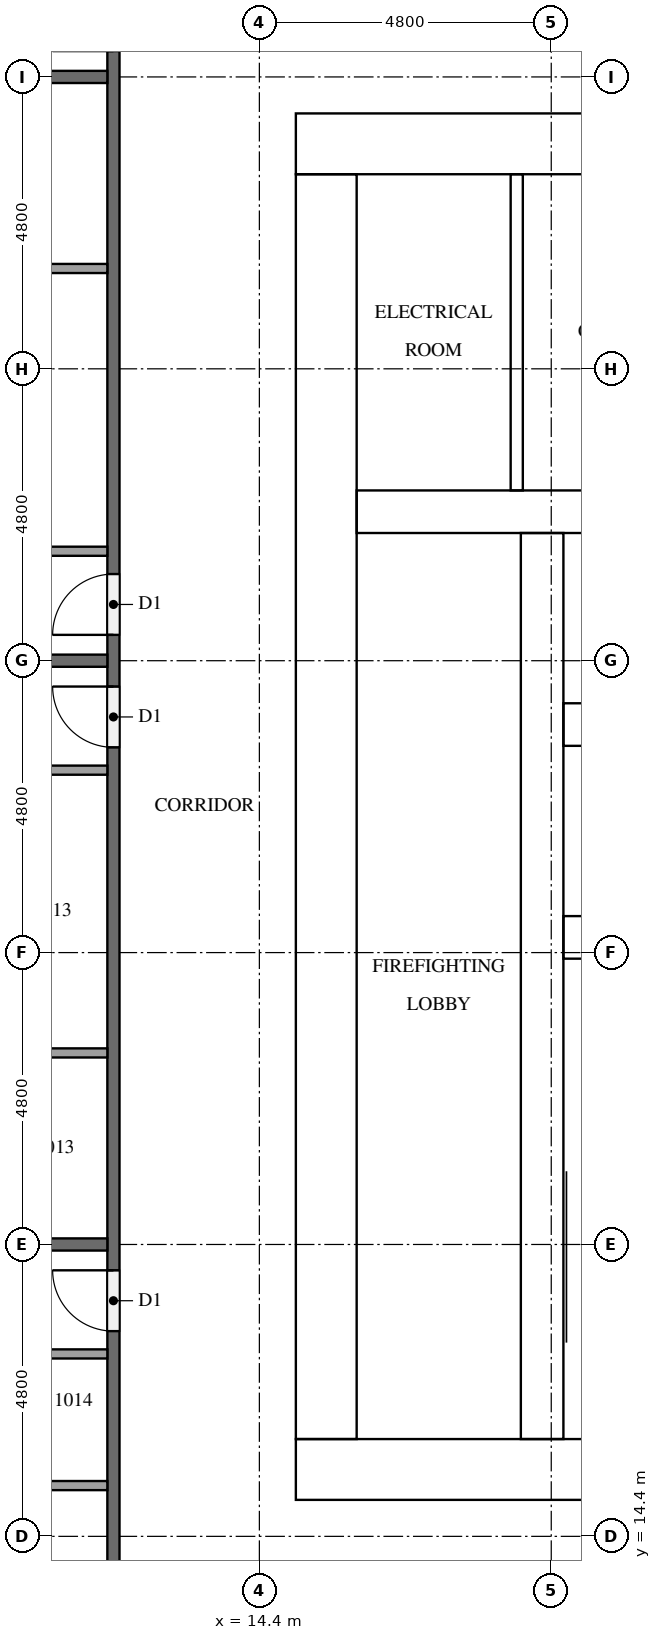
"""IFC4 building model, lengths in metres.
Left out: names, types, materials, properties, quantities, classifications, styles, units other than length and angle.
Written with IfcOpenShell. Run it as: python <this file> out.ifc"""

import sys

from ifc_helpers import new_model, si_unit, direction, frame, frame_2d, origin, place, context, subcontext, project, spatial, rectangle, extrude, element, fill, save


model = new_model("IFC4")
c1 = context("Model", 3, precision=1e-05, world=origin(), true_north=direction((0.0, 1.0)))
c2 = subcontext(c1, "Body", "Model", "MODEL_VIEW")
j1 = project(units=[si_unit("LENGTHUNIT", "METRE"), si_unit("PLANEANGLEUNIT", "RADIAN")], contexts=[c1])
p1 = place(None, origin())
s1 = spatial("IfcSite", under=j1, at=p1, CompositionType="ELEMENT")
p2 = place(p1, origin())
s2 = spatial("IfcBuilding", under=s1, at=p2, CompositionType="ELEMENT")
p3 = place(p2, frame((0.0, 0.0, 43.4)))
s3 = spatial("IfcBuildingStorey", under=s2, at=p3, CompositionType="ELEMENT", Elevation=43.4)
p4 = place(p3, frame((15.0, 15.5, 0.0), z_axis=(0.0, 0.0, 1.0), x_axis=(1.0, 0.0, 0.0)))
e1 = element("IfcWall", 1, at=p4, inside=s3, PredefinedType="SHEAR", context=c2, shape_type="SweptSolid", body=[
    extrude(rectangle(XDim=32.4, YDim=1.0, at=frame_2d((16.2, 0.0))), origin(), (0.0, 0.0, 1.0), 3.2),
])
p5 = place(p4, frame((15.3, 0.0, 0.0)))
e2 = element("IfcOpeningElement", 2, at=p5, cuts=e1, PredefinedType="OPENING", context=c2, shape_type="SweptSolid", body=[
    extrude(rectangle(XDim=1.8, YDim=2.1, at=frame_2d((0.9, 1.05))), frame((0.0, 0.51, 0.0), z_axis=(0.0, -1.0, 0.0), x_axis=(1.0, 0.0, 0.0)), (0.0, 0.0, 1.0), 1.02),
])
p6 = place(p3, frame((15.0, 37.3, 0.0), z_axis=(0.0, 0.0, 1.0), x_axis=(1.0, 0.0, 0.0)))
e3 = element("IfcWall", 3, at=p6, inside=s3, PredefinedType="SHEAR", context=c2, shape_type="SweptSolid", body=[
    extrude(rectangle(XDim=32.4, YDim=1.0, at=frame_2d((16.2, 0.0))), origin(), (0.0, 0.0, 1.0), 3.2),
])
p7 = place(p6, frame((15.3, 0.0, 0.0)))
e4 = element("IfcOpeningElement", 4, at=p7, cuts=e3, PredefinedType="OPENING", context=c2, shape_type="SweptSolid", body=[
    extrude(rectangle(XDim=1.8, YDim=2.1, at=frame_2d((0.9, 1.05))), frame((0.0, 0.51, 0.0), z_axis=(0.0, -1.0, 0.0), x_axis=(1.0, 0.0, 0.0)), (0.0, 0.0, 1.0), 1.02),
])
p8 = place(p6, frame((1.766, 0.0, 0.0)))
e5 = element("IfcOpeningElement", 5, at=p8, cuts=e3, PredefinedType="OPENING", context=c2, shape_type="SweptSolid", body=[
    extrude(rectangle(XDim=1.0, YDim=2.1, at=frame_2d((0.5, 1.05))), frame((0.0, 0.51, 0.0), z_axis=(0.0, -1.0, 0.0), x_axis=(1.0, 0.0, 0.0)), (0.0, 0.0, 1.0), 1.02),
])
p9 = place(p6, frame((5.241, 0.0, 0.0)))
e6 = element("IfcOpeningElement", 6, at=p9, cuts=e3, PredefinedType="OPENING", context=c2, shape_type="SweptSolid", body=[
    extrude(rectangle(XDim=1.0, YDim=2.1, at=frame_2d((0.5, 1.05))), frame((0.0, 0.51, 0.0), z_axis=(0.0, -1.0, 0.0), x_axis=(1.0, 0.0, 0.0)), (0.0, 0.0, 1.0), 1.02),
])
p10 = place(p3, frame((15.5, 16.0, 0.0), z_axis=(0.0, 0.0, 1.0), x_axis=(0.0, 1.0, 0.0)))
e7 = element("IfcWall", 7, at=p10, inside=s3, PredefinedType="SHEAR", context=c2, shape_type="SweptSolid", body=[
    extrude(rectangle(XDim=20.8, YDim=1.0, at=frame_2d((10.4, 0.0))), origin(), (0.0, 0.0, 1.0), 3.2),
])
p11 = place(p10, frame((4.76, 0.0, 0.0)))
e8 = element("IfcOpeningElement", 8, at=p11, cuts=e7, PredefinedType="OPENING", context=c2, shape_type="SweptSolid", body=[
    extrude(rectangle(XDim=1.2, YDim=2.1, at=frame_2d((0.6, 1.05))), frame((0.0, 0.51, 0.0), z_axis=(0.0, -1.0, 0.0), x_axis=(1.0, 0.0, 0.0)), (0.0, 0.0, 1.0), 1.02),
])
p12 = place(p3, frame((19.05, 16.0, 0.0), z_axis=(0.0, 0.0, 1.0), x_axis=(0.0, 1.0, 0.0)))
e9 = element("IfcWall", 9, at=p12, inside=s3, PredefinedType="SHEAR", context=c2, shape_type="SweptSolid", body=[
    extrude(rectangle(XDim=14.9, YDim=0.7, at=frame_2d((7.45, 0.0))), origin(), (0.0, 0.0, 1.0), 3.2),
])
p13 = place(p12, frame((9.45, 0.0, 0.0)))
e10 = element("IfcOpeningElement", 10, at=p13, cuts=e9, PredefinedType="OPENING", context=c2, shape_type="SweptSolid", body=[
    extrude(rectangle(XDim=1.1, YDim=2.1, at=frame_2d((0.55, 1.05))), frame((0.0, 0.36, 0.0), z_axis=(0.0, -1.0, 0.0), x_axis=(1.0, 0.0, 0.0)), (0.0, 0.0, 1.0), 0.72),
])
p14 = place(p12, frame((12.95, 0.0, 0.0)))
e11 = element("IfcOpeningElement", 11, at=p14, cuts=e9, PredefinedType="OPENING", context=c2, shape_type="SweptSolid", body=[
    extrude(rectangle(XDim=1.1, YDim=2.1, at=frame_2d((0.55, 1.05))), frame((0.0, 0.36, 0.0), z_axis=(0.0, -1.0, 0.0), x_axis=(1.0, 0.0, 0.0)), (0.0, 0.0, 1.0), 0.72),
])
p15 = place(p12, frame((0.2, 0.0, 0.0)))
e12 = element("IfcOpeningElement", 12, at=p15, cuts=e9, PredefinedType="OPENING", context=c2, shape_type="SweptSolid", body=[
    extrude(rectangle(XDim=1.2, YDim=2.1, at=frame_2d((0.6, 1.05))), frame((0.0, 0.36, 0.0), z_axis=(0.0, -1.0, 0.0), x_axis=(1.0, 0.0, 0.0)), (0.0, 0.0, 1.0), 0.72),
])
for number, where, z_axis, x_axis in (
    (13, (19.4, 24.25, 0.0), (0.0, 0.0, 1.0), (1.0, 0.0, 0.0)),
    (14, (19.4, 27.75, 0.0), (0.0, 0.0, 1.0), (1.0, 0.0, 0.0)),
):
    element("IfcWall", number, at=place(p3, frame(where, z_axis=z_axis, x_axis=x_axis)), inside=s3, PredefinedType="SHEAR", context=c2, shape_type="SweptSolid", body=[
        extrude(rectangle(XDim=3.35, YDim=0.7, at=frame_2d((1.675, 0.0))), origin(), (0.0, 0.0, 1.0), 3.2),
    ])
p16 = place(p3, frame((16.0, 31.25, 0.0), z_axis=(0.0, 0.0, 1.0), x_axis=(1.0, 0.0, 0.0)))
e15 = element("IfcWall", 15, at=p16, inside=s3, PredefinedType="SHEAR", context=c2, shape_type="SweptSolid", body=[
    extrude(rectangle(XDim=6.75, YDim=0.7, at=frame_2d((3.375, 0.0))), origin(), (0.0, 0.0, 1.0), 3.2),
])
p17 = place(p3, frame((18.633, 31.6, 0.0), z_axis=(0.0, 0.0, 1.0), x_axis=(0.0, 1.0, 0.0)))
e16 = element("IfcWall", 16, at=p17, inside=s3, PredefinedType="PARTITIONING", context=c2, shape_type="SweptSolid", body=[
    extrude(rectangle(XDim=5.2, YDim=0.2, at=frame_2d((2.6, 0.0))), origin(), (0.0, 0.0, 1.0), 3.2),
])
p18 = place(p3, frame((12.0, 12.1, 0.0), z_axis=(0.0, 0.0, 1.0), x_axis=(0.0, 1.0, 0.0)))
e17 = element("IfcWall", 17, at=p18, inside=s3, PredefinedType="PARTITIONING", context=c2, shape_type="SweptSolid", body=[
    extrude(rectangle(XDim=28.6, YDim=0.2, at=frame_2d((14.3, 0.0))), origin(), (0.0, 0.0, 1.0), 3.2),
])
p19 = place(p18, frame((26.725, 0.0, 0.0)))
e18 = element("IfcOpeningElement", 18, at=p19, cuts=e17, PredefinedType="OPENING", context=c2, shape_type="SweptSolid", body=[
    extrude(rectangle(XDim=1.0, YDim=2.1, at=frame_2d((0.5, 1.05))), frame((0.0, 0.11, 0.0), z_axis=(0.0, -1.0, 0.0), x_axis=(1.0, 0.0, 0.0)), (0.0, 0.0, 1.0), 0.22),
])
p20 = place(p18, frame((17.125, 0.0, 0.0)))
e19 = element("IfcOpeningElement", 19, at=p20, cuts=e17, PredefinedType="OPENING", context=c2, shape_type="SweptSolid", body=[
    extrude(rectangle(XDim=1.0, YDim=2.1, at=frame_2d((0.5, 1.05))), frame((0.0, 0.11, 0.0), z_axis=(0.0, -1.0, 0.0), x_axis=(1.0, 0.0, 0.0)), (0.0, 0.0, 1.0), 0.22),
])
p21 = place(p18, frame((15.275, 0.0, 0.0)))
e20 = element("IfcOpeningElement", 20, at=p21, cuts=e17, PredefinedType="OPENING", context=c2, shape_type="SweptSolid", body=[
    extrude(rectangle(XDim=1.0, YDim=2.1, at=frame_2d((0.5, 1.05))), frame((0.0, 0.11, 0.0), z_axis=(0.0, -1.0, 0.0), x_axis=(1.0, 0.0, 0.0)), (0.0, 0.0, 1.0), 0.22),
])
p22 = place(p18, frame((5.675, 0.0, 0.0)))
e21 = element("IfcOpeningElement", 21, at=p22, cuts=e17, PredefinedType="OPENING", context=c2, shape_type="SweptSolid", body=[
    extrude(rectangle(XDim=1.0, YDim=2.1, at=frame_2d((0.5, 1.05))), frame((0.0, 0.11, 0.0), z_axis=(0.0, -1.0, 0.0), x_axis=(1.0, 0.0, 0.0)), (0.0, 0.0, 1.0), 0.22),
])
for number, where, z_axis, x_axis in (
    (22, (0.1, 38.4, 0.0), (0.0, 0.0, 1.0), (1.0, 0.0, 0.0)),
    (23, (0.1, 28.8, 0.0), (0.0, 0.0, 1.0), (1.0, 0.0, 0.0)),
    (24, (0.1, 19.2, 0.0), (0.0, 0.0, 1.0), (1.0, 0.0, 0.0)),
):
    element("IfcWall", number, at=place(p3, frame(where, z_axis=z_axis, x_axis=x_axis)), inside=s3, PredefinedType="PARTITIONING", context=c2, shape_type="SweptSolid", body=[
        extrude(rectangle(XDim=11.8, YDim=0.2, at=frame_2d((5.9, 0.0))), origin(), (0.0, 0.0, 1.0), 3.2),
    ])
p23 = place(p3, frame((11.9, 35.25, 0.0), z_axis=(0.0, 0.0, 1.0), x_axis=(-1.0, 0.0, 0.0)))
e25 = element("IfcWall", 25, at=p23, inside=s3, PredefinedType="PARTITIONING", context=c2, shape_type="SweptSolid", body=[
    extrude(rectangle(XDim=4.475, YDim=0.15, at=frame_2d((2.237, 0.0))), origin(), (0.0, 0.0, 1.0), 3.2),
])
p24 = place(p3, frame((11.9, 30.6, 0.0), z_axis=(0.0, 0.0, 1.0), x_axis=(-1.0, 0.0, 0.0)))
e26 = element("IfcWall", 26, at=p24, inside=s3, PredefinedType="PARTITIONING", context=c2, shape_type="SweptSolid", body=[
    extrude(rectangle(XDim=4.625, YDim=0.15, at=frame_2d((2.312, 0.0))), origin(), (0.0, 0.0, 1.0), 3.2),
])
p25 = place(p3, frame((11.9, 22.35, 0.0), z_axis=(0.0, 0.0, 1.0), x_axis=(-1.0, 0.0, 0.0)))
e27 = element("IfcWall", 27, at=p25, inside=s3, PredefinedType="PARTITIONING", context=c2, shape_type="SweptSolid", body=[
    extrude(rectangle(XDim=3.275, YDim=0.15, at=frame_2d((1.637, 0.0))), origin(), (0.0, 0.0, 1.0), 3.2),
])
p26 = place(p3, frame((11.9, 27.0, 0.0), z_axis=(0.0, 0.0, 1.0), x_axis=(-1.0, 0.0, 0.0)))
e28 = element("IfcWall", 28, at=p26, inside=s3, PredefinedType="PARTITIONING", context=c2, shape_type="SweptSolid", body=[
    extrude(rectangle(XDim=3.425, YDim=0.15, at=frame_2d((1.712, 0.0))), origin(), (0.0, 0.0, 1.0), 3.2),
])
p27 = place(p3, frame((11.9, 15.235, 0.0), z_axis=(0.0, 0.0, 1.0), x_axis=(-1.0, 0.0, 0.0)))
e29 = element("IfcWall", 29, at=p27, inside=s3, PredefinedType="PARTITIONING", context=c2, shape_type="SweptSolid", body=[
    extrude(rectangle(XDim=2.975, YDim=0.15, at=frame_2d((1.487, 0.0))), origin(), (0.0, 0.0, 1.0), 3.2),
])
p28 = place(p3, frame((11.9, 17.4, 0.0), z_axis=(0.0, 0.0, 1.0), x_axis=(-1.0, 0.0, 0.0)))
e30 = element("IfcWall", 30, at=p28, inside=s3, PredefinedType="PARTITIONING", context=c2, shape_type="SweptSolid", body=[
    extrude(rectangle(XDim=3.125, YDim=0.15, at=frame_2d((1.562, 0.0))), origin(), (0.0, 0.0, 1.0), 3.2),
])
p29 = place(p13, origin())
e31 = element("IfcDoor", 31, at=p29, inside=s3, OperationType="DOUBLE_DOOR_SLIDING", PredefinedType="DOOR", context=c2, shape_type="SweptSolid", body=[
    extrude(rectangle(XDim=1.1, YDim=2.1, at=frame_2d((0.55, 1.05))), frame((0.0, 0.025, 0.0), z_axis=(0.0, -1.0, 0.0), x_axis=(1.0, 0.0, 0.0)), (0.0, 0.0, 1.0), 0.05),
])
fill(e10, e31)
p30 = place(p14, origin())
e32 = element("IfcDoor", 32, at=p30, inside=s3, OperationType="DOUBLE_DOOR_SLIDING", PredefinedType="DOOR", context=c2, shape_type="SweptSolid", body=[
    extrude(rectangle(XDim=1.1, YDim=2.1, at=frame_2d((0.55, 1.05))), frame((0.0, 0.025, 0.0), z_axis=(0.0, -1.0, 0.0), x_axis=(1.0, 0.0, 0.0)), (0.0, 0.0, 1.0), 0.05),
])
fill(e11, e32)
p31 = place(p15, frame((1.2, 0.0, 0.0), z_axis=(0.0, 0.0, 1.0), x_axis=(-1.0, 0.0, 0.0)))
e33 = element("IfcDoor", 33, at=p31, inside=s3, OperationType="SINGLE_SWING_RIGHT", PredefinedType="DOOR", context=c2, shape_type="SweptSolid", body=[
    extrude(rectangle(XDim=1.2, YDim=2.1, at=frame_2d((0.6, 1.05))), frame((0.0, 0.025, 0.0), z_axis=(0.0, -1.0, 0.0), x_axis=(1.0, 0.0, 0.0)), (0.0, 0.0, 1.0), 0.05),
])
fill(e12, e33)
p32 = place(p11, frame((1.2, 0.0, 0.0), z_axis=(0.0, 0.0, 1.0), x_axis=(-1.0, 0.0, 0.0)))
e34 = element("IfcDoor", 34, at=p32, inside=s3, OperationType="SINGLE_SWING_LEFT", PredefinedType="DOOR", context=c2, shape_type="SweptSolid", body=[
    extrude(rectangle(XDim=1.2, YDim=2.1, at=frame_2d((0.6, 1.05))), frame((0.0, 0.025, 0.0), z_axis=(0.0, -1.0, 0.0), x_axis=(1.0, 0.0, 0.0)), (0.0, 0.0, 1.0), 0.05),
])
fill(e8, e34)
p33 = place(p8, origin())
e35 = element("IfcDoor", 35, at=p33, inside=s3, OperationType="SINGLE_SWING_LEFT", PredefinedType="DOOR", context=c2, shape_type="SweptSolid", body=[
    extrude(rectangle(XDim=1.0, YDim=2.1, at=frame_2d((0.5, 1.05))), frame((0.0, 0.025, 0.0), z_axis=(0.0, -1.0, 0.0), x_axis=(1.0, 0.0, 0.0)), (0.0, 0.0, 1.0), 0.05),
])
fill(e5, e35)
p34 = place(p20, origin())
e36 = element("IfcDoor", 36, at=p34, inside=s3, OperationType="SINGLE_SWING_LEFT", PredefinedType="DOOR", context=c2, shape_type="SweptSolid", body=[
    extrude(rectangle(XDim=1.0, YDim=2.1, at=frame_2d((0.5, 1.05))), frame((0.0, 0.025, 0.0), z_axis=(0.0, -1.0, 0.0), x_axis=(1.0, 0.0, 0.0)), (0.0, 0.0, 1.0), 0.05),
])
fill(e19, e36)
p35 = place(p21, origin())
e37 = element("IfcDoor", 37, at=p35, inside=s3, OperationType="SINGLE_SWING_RIGHT", PredefinedType="DOOR", context=c2, shape_type="SweptSolid", body=[
    extrude(rectangle(XDim=1.0, YDim=2.1, at=frame_2d((0.5, 1.05))), frame((0.0, 0.025, 0.0), z_axis=(0.0, -1.0, 0.0), x_axis=(1.0, 0.0, 0.0)), (0.0, 0.0, 1.0), 0.05),
])
fill(e20, e37)
p36 = place(p22, origin())
e38 = element("IfcDoor", 38, at=p36, inside=s3, OperationType="SINGLE_SWING_RIGHT", PredefinedType="DOOR", context=c2, shape_type="SweptSolid", body=[
    extrude(rectangle(XDim=1.0, YDim=2.1, at=frame_2d((0.5, 1.05))), frame((0.0, 0.025, 0.0), z_axis=(0.0, -1.0, 0.0), x_axis=(1.0, 0.0, 0.0)), (0.0, 0.0, 1.0), 0.05),
])
fill(e21, e38)
save(model, sys.argv[1])
